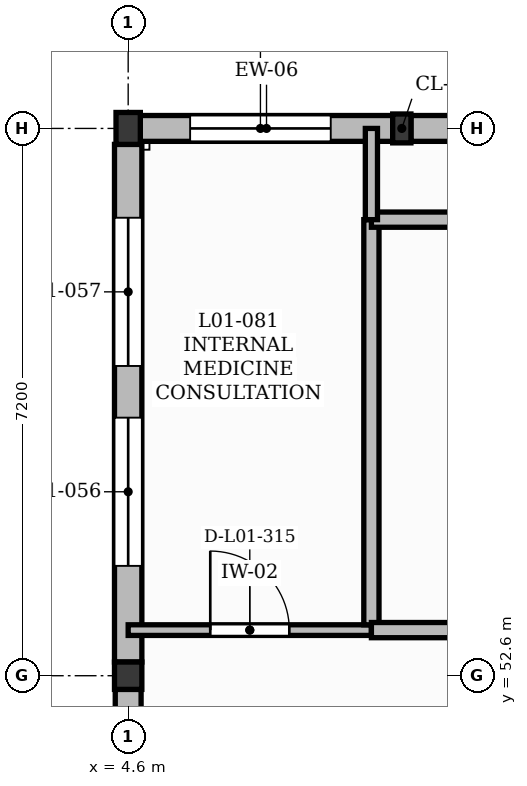
"""IFC4 building model, lengths in metres.
Left out: names, types, materials, properties, quantities, classifications, styles, units other than length and angle.
Written with IfcOpenShell. Run it as: python <this file> out.ifc"""

import sys

from ifc_helpers import new_model, si_unit, direction, frame, frame_2d, origin, origin_2d, place, context, subcontext, project, spatial, rectangle, extrude, element, fill, save


model = new_model("IFC4")
c1 = context("Model", 3, precision=1e-05, world=origin(), true_north=direction((0.0, 1.0)))
c2 = subcontext(c1, "Body", "Model", "MODEL_VIEW")
j1 = project(units=[si_unit("LENGTHUNIT", "METRE"), si_unit("PLANEANGLEUNIT", "RADIAN")], contexts=[c1])
p1 = place(None, origin())
s1 = spatial("IfcSite", under=j1, at=p1, CompositionType="ELEMENT")
p2 = place(p1, origin())
s2 = spatial("IfcBuilding", under=s1, at=p2, CompositionType="ELEMENT")
p3 = place(p2, frame((0.0, 0.0, 4.5)))
s3 = spatial("IfcBuildingStorey", under=s2, at=p3, CompositionType="ELEMENT", Elevation=4.5)
p4 = place(p3, frame((4.6, 52.6, 0.0), z_axis=(0.0, 0.0, 1.0), x_axis=(1.0, 0.0, 0.0)))
e1 = element("IfcColumn", 1, at=p4, inside=s3, PredefinedType="COLUMN", context=c2, shape_type="SweptSolid", body=[
    extrude(rectangle(XDim=0.36, YDim=0.36, at=origin_2d()), origin(), (0.0, 0.0, 1.0), 4.26),
])
p5 = place(p3, frame((4.6, 59.8, 0.0), z_axis=(0.0, 0.0, 1.0), x_axis=(1.0, 0.0, 0.0)))
e2 = element("IfcColumn", 2, at=p5, inside=s3, PredefinedType="COLUMN", context=c2, shape_type="SweptSolid", body=[
    extrude(rectangle(XDim=0.32, YDim=0.42, at=origin_2d()), origin(), (0.0, 0.0, 1.0), 4.26),
])
p6 = place(p3, frame((8.2, 59.8, 0.0), z_axis=(0.0, 0.0, 1.0), x_axis=(1.0, 0.0, 0.0)))
e3 = element("IfcColumn", 3, at=p6, inside=s3, PredefinedType="PILASTER", context=c2, shape_type="SweptSolid", body=[
    extrude(rectangle(XDim=0.24, YDim=0.38, at=origin_2d()), origin(), (0.0, 0.0, 1.0), 4.26),
])
p7 = place(p3, frame((4.6, 45.61, 0.0), z_axis=(0.0, 0.0, 1.0), x_axis=(0.0, 1.0, 0.0)))
e4 = element("IfcWall", 4, at=p7, inside=s3, PredefinedType="SOLIDWALL", context=c2, shape_type="SweptSolid", body=[
    extrude(rectangle(XDim=6.81, YDim=0.34, at=frame_2d((3.405, 0.0))), origin(), (0.0, 0.0, 1.0), 3.8),
])
p8 = place(p7, frame((1.78, 0.0, 0.9)))
e5 = element("IfcOpeningElement", 5, at=p8, cuts=e4, PredefinedType="OPENING", context=c2, shape_type="SweptSolid", body=[
    extrude(rectangle(XDim=1.55, YDim=2.4, at=frame_2d((0.775, 1.2))), frame((0.0, 0.18, 0.0), z_axis=(0.0, -1.0, 0.0), x_axis=(1.0, 0.0, 0.0)), (0.0, 0.0, 1.0), 0.36),
])
p9 = place(p3, frame((4.76, 59.8, 0.0), z_axis=(0.0, 0.0, 1.0), x_axis=(1.0, 0.0, 0.0)))
e6 = element("IfcWall", 6, at=p9, inside=s3, PredefinedType="SOLIDWALL", context=c2, shape_type="SweptSolid", body=[
    extrude(rectangle(XDim=3.32, YDim=0.34, at=frame_2d((1.66, 0.0))), origin(), (0.0, 0.0, 1.0), 3.8),
])
p10 = place(p9, frame((0.655, 0.0, 1.0)))
e7 = element("IfcOpeningElement", 7, at=p10, cuts=e6, PredefinedType="OPENING", context=c2, shape_type="SweptSolid", body=[
    extrude(rectangle(XDim=1.85, YDim=2.2, at=frame_2d((0.925, 1.1))), frame((0.0, 0.18, 0.0), z_axis=(0.0, -1.0, 0.0), x_axis=(1.0, 0.0, 0.0)), (0.0, 0.0, 1.0), 0.36),
])
p11 = place(p3, frame((8.32, 59.8, 0.0), z_axis=(0.0, 0.0, 1.0), x_axis=(1.0, 0.0, 0.0)))
e8 = element("IfcWall", 8, at=p11, inside=s3, PredefinedType="SOLIDWALL", context=c2, shape_type="SweptSolid", body=[
    extrude(rectangle(XDim=3.3, YDim=0.34, at=frame_2d((1.65, 0.0))), origin(), (0.0, 0.0, 1.0), 3.8),
])
p12 = place(p11, frame((1.04, 0.0, 1.0)))
e9 = element("IfcOpeningElement", 9, at=p12, cuts=e8, PredefinedType="OPENING", context=c2, shape_type="SweptSolid", body=[
    extrude(rectangle(XDim=1.22, YDim=2.2, at=frame_2d((0.61, 1.1))), frame((0.0, 0.18, 0.0), z_axis=(0.0, -1.0, 0.0), x_axis=(1.0, 0.0, 0.0)), (0.0, 0.0, 1.0), 0.36),
])
p13 = place(p3, frame((4.6, 52.78, 0.0), z_axis=(0.0, 0.0, 1.0), x_axis=(0.0, 1.0, 0.0)))
e10 = element("IfcWall", 10, at=p13, inside=s3, PredefinedType="SOLIDWALL", context=c2, shape_type="SweptSolid", body=[
    extrude(rectangle(XDim=6.81, YDim=0.36, at=frame_2d((3.405, 0.0))), origin(), (0.0, 0.0, 1.0), 3.8),
])
p14 = place(p13, frame((1.265, 0.0, 0.9)))
e11 = element("IfcOpeningElement", 11, at=p14, cuts=e10, PredefinedType="OPENING", context=c2, shape_type="SweptSolid", body=[
    extrude(rectangle(XDim=1.95, YDim=2.4, at=frame_2d((0.975, 1.2))), frame((0.0, 0.19, 0.0), z_axis=(0.0, -1.0, 0.0), x_axis=(1.0, 0.0, 0.0)), (0.0, 0.0, 1.0), 0.38),
])
p15 = place(p13, frame((3.895, 0.0, 0.9)))
e12 = element("IfcOpeningElement", 12, at=p15, cuts=e10, PredefinedType="OPENING", context=c2, shape_type="SweptSolid", body=[
    extrude(rectangle(XDim=1.95, YDim=2.4, at=frame_2d((0.975, 1.2))), frame((0.0, 0.19, 0.0), z_axis=(0.0, -1.0, 0.0), x_axis=(1.0, 0.0, 0.0)), (0.0, 0.0, 1.0), 0.38),
])
p16 = place(p3, frame((4.6, 53.2, 0.0), z_axis=(0.0, 0.0, 1.0), x_axis=(1.0, 0.0, 0.0)))
e13 = element("IfcWall", 13, at=p16, inside=s3, PredefinedType="PARTITIONING", context=c2, shape_type="SweptSolid", body=[
    extrude(rectangle(XDim=3.2, YDim=0.14, at=frame_2d((1.6, 0.0))), origin(), (0.0, 0.0, 1.0), 4.18),
])
p17 = place(p16, frame((1.08, 0.0, 0.0)))
e14 = element("IfcOpeningElement", 14, at=p17, cuts=e13, PredefinedType="OPENING", context=c2, shape_type="SweptSolid", body=[
    extrude(rectangle(XDim=1.04, YDim=2.1, at=frame_2d((0.52, 1.05))), frame((0.0, 0.08, 0.0), z_axis=(0.0, -1.0, 0.0), x_axis=(1.0, 0.0, 0.0)), (0.0, 0.0, 1.0), 0.16),
])
p18 = place(p3, frame((7.8, 53.27, 0.0), z_axis=(0.0, 0.0, 1.0), x_axis=(0.0, 1.0, 0.0)))
e15 = element("IfcWall", 15, at=p18, inside=s3, PredefinedType="PARTITIONING", context=c2, shape_type="SweptSolid", body=[
    extrude(rectangle(XDim=5.33, YDim=0.2, at=frame_2d((2.665, 0.0))), origin(), (0.0, 0.0, 1.0), 4.18),
])
p19 = place(p3, frame((7.8, 53.2, 0.0), z_axis=(0.0, 0.0, 1.0), x_axis=(1.0, 0.0, 0.0)))
e16 = element("IfcWall", 16, at=p19, inside=s3, PredefinedType="PARTITIONING", context=c2, shape_type="SweptSolid", body=[
    extrude(rectangle(XDim=4.29, YDim=0.2, at=frame_2d((2.145, 0.0))), origin(), (0.0, 0.0, 1.0), 4.18),
])
p20 = place(p19, frame((1.405, 0.0, 0.0)))
e17 = element("IfcOpeningElement", 17, at=p20, cuts=e16, PredefinedType="OPENING", context=c2, shape_type="SweptSolid", body=[
    extrude(rectangle(XDim=1.48, YDim=2.25, at=frame_2d((0.74, 1.125))), frame((0.0, 0.11, 0.0), z_axis=(0.0, -1.0, 0.0), x_axis=(1.0, 0.0, 0.0)), (0.0, 0.0, 1.0), 0.22),
])
p21 = place(p3, frame((12.06, 58.6, 0.0), z_axis=(0.0, 0.0, 1.0), x_axis=(-1.0, 0.0, 0.0)))
e18 = element("IfcWall", 18, at=p21, inside=s3, PredefinedType="PARTITIONING", context=c2, shape_type="SweptSolid", body=[
    extrude(rectangle(XDim=4.26, YDim=0.2, at=frame_2d((2.13, 0.0))), origin(), (0.0, 0.0, 1.0), 4.18),
])
p22 = place(p3, frame((7.8, 58.6, 0.0), z_axis=(0.0, 0.0, 1.0), x_axis=(0.0, 1.0, 0.0)))
e19 = element("IfcWall", 19, at=p22, inside=s3, PredefinedType="PARTITIONING", context=c2, shape_type="SweptSolid", body=[
    extrude(rectangle(XDim=1.2, YDim=0.16, at=frame_2d((0.6, 0.0))), origin(), (0.0, 0.0, 1.0), 4.18),
])
p23 = place(p10, origin())
e20 = element("IfcWindow", 20, at=p23, inside=s3, PartitioningType="DOUBLE_PANEL_VERTICAL", PredefinedType="WINDOW", context=c2, shape_type="SweptSolid", body=[
    extrude(rectangle(XDim=1.85, YDim=2.2, at=frame_2d((0.925, 1.1))), frame((0.0, 0.03, 0.0), z_axis=(0.0, -1.0, 0.0), x_axis=(1.0, 0.0, 0.0)), (0.0, 0.0, 1.0), 0.06),
])
fill(e7, e20)
p24 = place(p14, origin())
e21 = element("IfcWindow", 21, at=p24, inside=s3, PartitioningType="DOUBLE_PANEL_VERTICAL", PredefinedType="WINDOW", context=c2, shape_type="SweptSolid", body=[
    extrude(rectangle(XDim=1.95, YDim=2.4, at=frame_2d((0.975, 1.2))), frame((0.0, 0.03, 0.0), z_axis=(0.0, -1.0, 0.0), x_axis=(1.0, 0.0, 0.0)), (0.0, 0.0, 1.0), 0.06),
])
fill(e11, e21)
p25 = place(p15, origin())
e22 = element("IfcWindow", 22, at=p25, inside=s3, PartitioningType="DOUBLE_PANEL_VERTICAL", PredefinedType="WINDOW", context=c2, shape_type="SweptSolid", body=[
    extrude(rectangle(XDim=1.95, YDim=2.4, at=frame_2d((0.975, 1.2))), frame((0.0, 0.03, 0.0), z_axis=(0.0, -1.0, 0.0), x_axis=(1.0, 0.0, 0.0)), (0.0, 0.0, 1.0), 0.06),
])
fill(e12, e22)
p26 = place(p17, origin())
e23 = element("IfcDoor", 23, at=p26, inside=s3, OperationType="SINGLE_SWING_LEFT", PredefinedType="DOOR", context=c2, shape_type="SweptSolid", body=[
    extrude(rectangle(XDim=1.04, YDim=2.1, at=frame_2d((0.52, 1.05))), frame((0.0, 0.025, 0.0), z_axis=(0.0, -1.0, 0.0), x_axis=(1.0, 0.0, 0.0)), (0.0, 0.0, 1.0), 0.05),
])
fill(e14, e23)
save(model, sys.argv[1])
